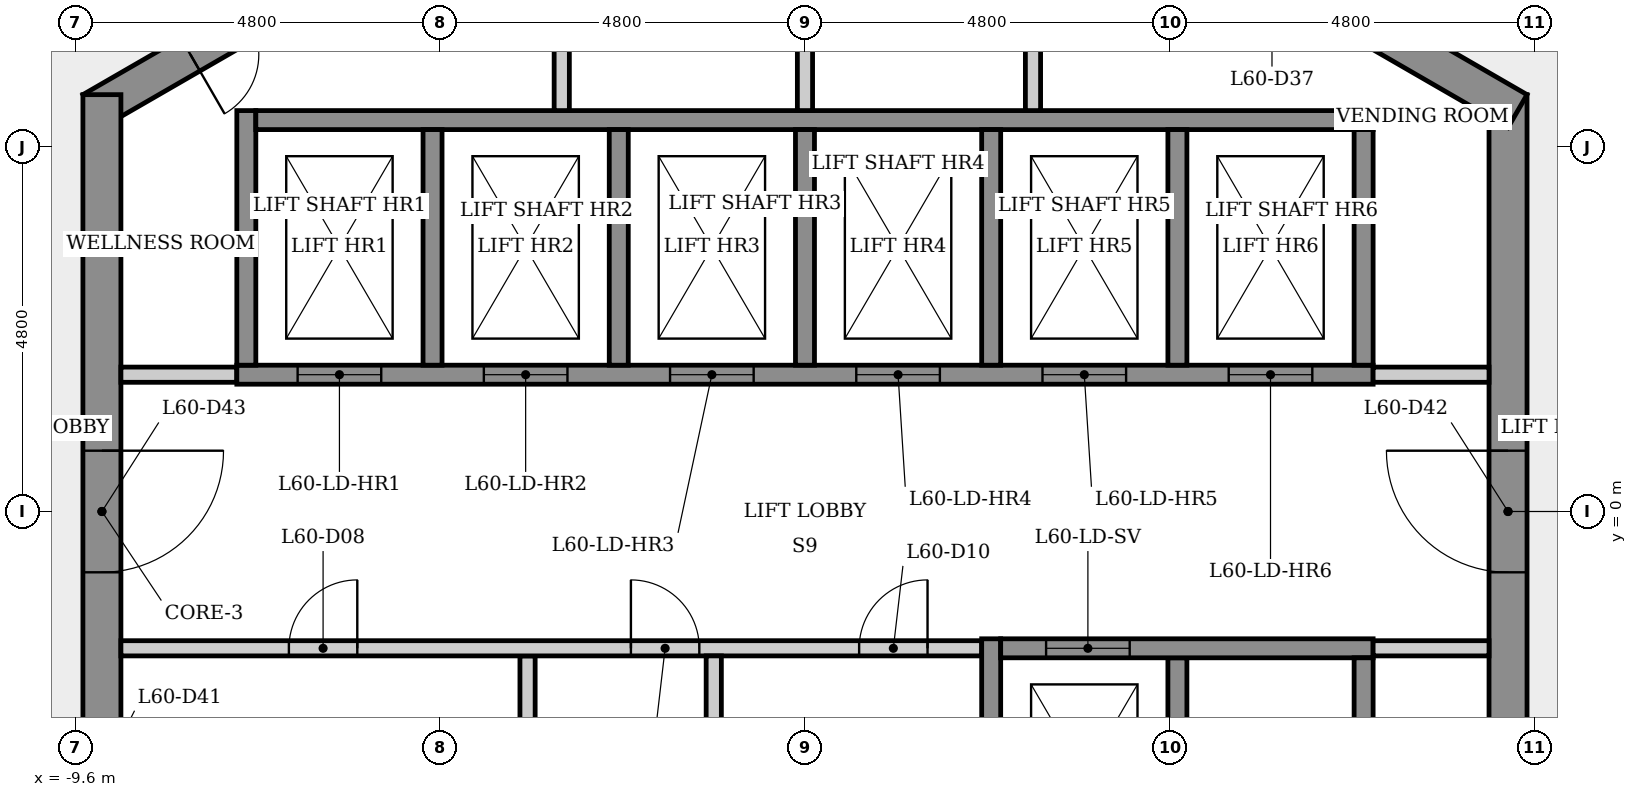
"""IFC4 building model, lengths in metres.
Left out: names, types, materials, properties, quantities, classifications, styles, units other than length and angle.
Written with IfcOpenShell. Run it as: python <this file> out.ifc"""

import sys

from ifc_helpers import new_model, si_unit, direction, frame, frame_2d, origin, place, context, subcontext, project, spatial, rectangle, extrude, element, fill, save


model = new_model("IFC4")
c1 = context("Model", 3, precision=1e-05, world=origin(), true_north=direction((0.0, 1.0)))
c2 = subcontext(c1, "Body", "Model", "MODEL_VIEW")
j1 = project(units=[si_unit("LENGTHUNIT", "METRE"), si_unit("PLANEANGLEUNIT", "RADIAN")], contexts=[c1])
p1 = place(None, origin())
s1 = spatial("IfcSite", under=j1, at=p1, CompositionType="ELEMENT")
p2 = place(p1, origin())
s2 = spatial("IfcBuilding", under=s1, at=p2, CompositionType="ELEMENT")
p3 = place(p2, frame((0.0, 0.0, 225.7)))
s3 = spatial("IfcBuildingStorey", under=s2, at=p3, CompositionType="ELEMENT", Elevation=225.7)
p4 = place(p3, frame((9.25, -5.485, 0.0), z_axis=(0.0, 0.0, 1.0), x_axis=(0.0, 1.0, 0.0)))
e1 = element("IfcWall", 1, at=p4, inside=s3, PredefinedType="SHEAR", context=c2, shape_type="SweptSolid", body=[
    extrude(rectangle(XDim=10.97, YDim=0.5, at=frame_2d((5.485, 0.0))), origin(), (0.0, 0.0, 1.0), 3.4),
])
p5 = place(p4, frame((4.685, 0.0, 0.0)))
e2 = element("IfcOpeningElement", 2, at=p5, cuts=e1, PredefinedType="OPENING", context=c2, shape_type="SweptSolid", body=[
    extrude(rectangle(XDim=1.6, YDim=2.1, at=frame_2d((0.8, 1.05))), frame((0.0, 0.26, 0.0), z_axis=(0.0, -1.0, 0.0), x_axis=(1.0, 0.0, 0.0)), (0.0, 0.0, 1.0), 0.52),
])
p6 = place(p3, frame((9.375, 5.268, 0.0), z_axis=(0.0, 0.0, 1.0), x_axis=(-0.866023993627, 0.500002442456, 0.0)))
e3 = element("IfcWall", 3, at=p6, inside=s3, PredefinedType="SHEAR", context=c2, shape_type="SweptSolid", body=[
    extrude(rectangle(XDim=10.97, YDim=0.5, at=frame_2d((5.485, 0.0))), origin(), (0.0, 0.0, 1.0), 3.4),
])
p7 = place(p6, frame((8.5, 0.0, 0.0)))
e4 = element("IfcOpeningElement", 4, at=p7, cuts=e3, PredefinedType="OPENING", context=c2, shape_type="SweptSolid", body=[
    extrude(rectangle(XDim=0.9, YDim=2.1, at=frame_2d((0.45, 1.05))), frame((0.0, 0.26, 0.0), z_axis=(0.0, -1.0, 0.0), x_axis=(1.0, 0.0, 0.0)), (0.0, 0.0, 1.0), 0.52),
])
p8 = place(p6, frame((3.28, 0.0, 0.0)))
e5 = element("IfcOpeningElement", 5, at=p8, cuts=e3, PredefinedType="OPENING", context=c2, shape_type="SweptSolid", body=[
    extrude(rectangle(XDim=0.9, YDim=2.1, at=frame_2d((0.45, 1.05))), frame((0.0, 0.26, 0.0), z_axis=(0.0, -1.0, 0.0), x_axis=(1.0, 0.0, 0.0)), (0.0, 0.0, 1.0), 0.52),
])
p9 = place(p3, frame((0.125, 10.753, 0.0), z_axis=(0.0, 0.0, 1.0), x_axis=(-0.866023993627, -0.500002442456, 0.0)))
e6 = element("IfcWall", 6, at=p9, inside=s3, PredefinedType="SHEAR", context=c2, shape_type="SweptSolid", body=[
    extrude(rectangle(XDim=10.97, YDim=0.5, at=frame_2d((5.485, 0.0))), origin(), (0.0, 0.0, 1.0), 3.4),
])
p10 = place(p9, frame((8.581, 0.0, 0.0)))
e7 = element("IfcOpeningElement", 7, at=p10, cuts=e6, PredefinedType="OPENING", context=c2, shape_type="SweptSolid", body=[
    extrude(rectangle(XDim=0.9, YDim=2.1, at=frame_2d((0.45, 1.05))), frame((0.0, 0.26, 0.0), z_axis=(0.0, -1.0, 0.0), x_axis=(1.0, 0.0, 0.0)), (0.0, 0.0, 1.0), 0.52),
])
p11 = place(p9, frame((1.687, 0.0, 0.0)))
e8 = element("IfcOpeningElement", 8, at=p11, cuts=e6, PredefinedType="OPENING", context=c2, shape_type="SweptSolid", body=[
    extrude(rectangle(XDim=0.9, YDim=2.1, at=frame_2d((0.45, 1.05))), frame((0.0, 0.26, 0.0), z_axis=(0.0, -1.0, 0.0), x_axis=(1.0, 0.0, 0.0)), (0.0, 0.0, 1.0), 0.52),
])
p12 = place(p3, frame((-9.25, 5.485, 0.0), z_axis=(0.0, 0.0, 1.0), x_axis=(0.0, -1.0, 0.0)))
e9 = element("IfcWall", 9, at=p12, inside=s3, PredefinedType="SHEAR", context=c2, shape_type="SweptSolid", body=[
    extrude(rectangle(XDim=10.97, YDim=0.5, at=frame_2d((5.485, 0.0))), origin(), (0.0, 0.0, 1.0), 3.4),
])
p13 = place(p12, frame((8.51, 0.0, 0.0)))
e10 = element("IfcOpeningElement", 10, at=p13, cuts=e9, PredefinedType="OPENING", context=c2, shape_type="SweptSolid", body=[
    extrude(rectangle(XDim=0.9, YDim=2.1, at=frame_2d((0.45, 1.05))), frame((0.0, 0.26, 0.0), z_axis=(0.0, -1.0, 0.0), x_axis=(1.0, 0.0, 0.0)), (0.0, 0.0, 1.0), 0.52),
])
p14 = place(p12, frame((4.685, 0.0, 0.0)))
e11 = element("IfcOpeningElement", 11, at=p14, cuts=e9, PredefinedType="OPENING", context=c2, shape_type="SweptSolid", body=[
    extrude(rectangle(XDim=1.6, YDim=2.1, at=frame_2d((0.8, 1.05))), frame((0.0, 0.26, 0.0), z_axis=(0.0, -1.0, 0.0), x_axis=(1.0, 0.0, 0.0)), (0.0, 0.0, 1.0), 0.52),
])
p15 = place(p3, frame((-9.0, 1.8, 0.0), z_axis=(0.0, 0.0, 1.0), x_axis=(1.0, 0.0, 0.0)))
e12 = element("IfcWall", 12, at=p15, inside=s3, PredefinedType="PARTITIONING", context=c2, shape_type="SweptSolid", body=[
    extrude(rectangle(XDim=1.525, YDim=0.2, at=frame_2d((0.763, 0.0))), origin(), (0.0, 0.0, 1.0), 3.05),
])
p16 = place(p3, frame((-7.475, 1.8, 0.0), z_axis=(0.0, 0.0, 1.0), x_axis=(1.0, 0.0, 0.0)))
e13 = element("IfcWall", 13, at=p16, inside=s3, PredefinedType="SHEAR", context=c2, shape_type="SweptSolid", body=[
    extrude(rectangle(XDim=14.95, YDim=0.25, at=frame_2d((7.475, 0.0))), origin(), (0.0, 0.0, 1.0), 3.05),
])
p17 = place(p16, frame((0.8, 0.0, 0.0)))
e14 = element("IfcOpeningElement", 14, at=p17, cuts=e13, PredefinedType="OPENING", context=c2, shape_type="SweptSolid", body=[
    extrude(rectangle(XDim=1.1, YDim=2.1, at=frame_2d((0.55, 1.05))), frame((0.0, 0.135, 0.0), z_axis=(0.0, -1.0, 0.0), x_axis=(1.0, 0.0, 0.0)), (0.0, 0.0, 1.0), 0.27),
])
p18 = place(p16, frame((3.25, 0.0, 0.0)))
e15 = element("IfcOpeningElement", 15, at=p18, cuts=e13, PredefinedType="OPENING", context=c2, shape_type="SweptSolid", body=[
    extrude(rectangle(XDim=1.1, YDim=2.1, at=frame_2d((0.55, 1.05))), frame((0.0, 0.135, 0.0), z_axis=(0.0, -1.0, 0.0), x_axis=(1.0, 0.0, 0.0)), (0.0, 0.0, 1.0), 0.27),
])
p19 = place(p16, frame((5.7, 0.0, 0.0)))
e16 = element("IfcOpeningElement", 16, at=p19, cuts=e13, PredefinedType="OPENING", context=c2, shape_type="SweptSolid", body=[
    extrude(rectangle(XDim=1.1, YDim=2.1, at=frame_2d((0.55, 1.05))), frame((0.0, 0.135, 0.0), z_axis=(0.0, -1.0, 0.0), x_axis=(1.0, 0.0, 0.0)), (0.0, 0.0, 1.0), 0.27),
])
p20 = place(p16, frame((8.15, 0.0, 0.0)))
e17 = element("IfcOpeningElement", 17, at=p20, cuts=e13, PredefinedType="OPENING", context=c2, shape_type="SweptSolid", body=[
    extrude(rectangle(XDim=1.1, YDim=2.1, at=frame_2d((0.55, 1.05))), frame((0.0, 0.135, 0.0), z_axis=(0.0, -1.0, 0.0), x_axis=(1.0, 0.0, 0.0)), (0.0, 0.0, 1.0), 0.27),
])
p21 = place(p16, frame((10.6, 0.0, 0.0)))
e18 = element("IfcOpeningElement", 18, at=p21, cuts=e13, PredefinedType="OPENING", context=c2, shape_type="SweptSolid", body=[
    extrude(rectangle(XDim=1.1, YDim=2.1, at=frame_2d((0.55, 1.05))), frame((0.0, 0.135, 0.0), z_axis=(0.0, -1.0, 0.0), x_axis=(1.0, 0.0, 0.0)), (0.0, 0.0, 1.0), 0.27),
])
p22 = place(p16, frame((13.05, 0.0, 0.0)))
e19 = element("IfcOpeningElement", 19, at=p22, cuts=e13, PredefinedType="OPENING", context=c2, shape_type="SweptSolid", body=[
    extrude(rectangle(XDim=1.1, YDim=2.1, at=frame_2d((0.55, 1.05))), frame((0.0, 0.135, 0.0), z_axis=(0.0, -1.0, 0.0), x_axis=(1.0, 0.0, 0.0)), (0.0, 0.0, 1.0), 0.27),
])
p23 = place(p3, frame((-7.35, 1.925, 0.0), z_axis=(0.0, 0.0, 1.0), x_axis=(0.0, 1.0, 0.0)))
e20 = element("IfcWall", 20, at=p23, inside=s3, PredefinedType="SHEAR", context=c2, shape_type="SweptSolid", body=[
    extrude(rectangle(XDim=3.35, YDim=0.25, at=frame_2d((1.675, 0.0))), origin(), (0.0, 0.0, 1.0), 3.05),
])
p24 = place(p3, frame((-7.225, 5.15, 0.0), z_axis=(0.0, 0.0, 1.0), x_axis=(1.0, 0.0, 0.0)))
e21 = element("IfcWall", 21, at=p24, inside=s3, PredefinedType="SHEAR", context=c2, shape_type="SweptSolid", body=[
    extrude(rectangle(XDim=14.7, YDim=0.25, at=frame_2d((7.35, 0.0))), origin(), (0.0, 0.0, 1.0), 3.05),
])
p25 = place(p3, frame((-4.9, 5.025, 0.0), z_axis=(0.0, 0.0, 1.0), x_axis=(0.0, -1.0, 0.0)))
e22 = element("IfcWall", 22, at=p25, inside=s3, PredefinedType="SHEAR", context=c2, shape_type="SweptSolid", body=[
    extrude(rectangle(XDim=3.1, YDim=0.25, at=frame_2d((1.55, 0.0))), origin(), (0.0, 0.0, 1.0), 3.4),
])
p26 = place(p3, frame((-3.65, -1.9, 0.0), z_axis=(0.0, 0.0, 1.0), x_axis=(0.0, -1.0, 0.0)))
e23 = element("IfcWall", 23, at=p26, inside=s3, PredefinedType="PARTITIONING", context=c2, shape_type="SweptSolid", body=[
    extrude(rectangle(XDim=3.15, YDim=0.2, at=frame_2d((1.575, 0.0))), origin(), (0.0, 0.0, 1.0), 3.05),
])
p27 = place(p3, frame((-9.0, -1.8, 0.0), z_axis=(0.0, 0.0, 1.0), x_axis=(1.0, 0.0, 0.0)))
e24 = element("IfcWall", 24, at=p27, inside=s3, PredefinedType="PARTITIONING", context=c2, shape_type="SweptSolid", body=[
    extrude(rectangle(XDim=11.325, YDim=0.2, at=frame_2d((5.663, 0.0))), origin(), (0.0, 0.0, 1.0), 3.05),
])
p28 = place(p27, frame((2.21, 0.0, 0.0)))
e25 = element("IfcOpeningElement", 25, at=p28, cuts=e24, PredefinedType="OPENING", context=c2, shape_type="SweptSolid", body=[
    extrude(rectangle(XDim=0.9, YDim=2.1, at=frame_2d((0.45, 1.05))), frame((0.0, 0.11, 0.0), z_axis=(0.0, -1.0, 0.0), x_axis=(1.0, 0.0, 0.0)), (0.0, 0.0, 1.0), 0.22),
])
p29 = place(p27, frame((6.71, 0.0, 0.0)))
e26 = element("IfcOpeningElement", 26, at=p29, cuts=e24, PredefinedType="OPENING", context=c2, shape_type="SweptSolid", body=[
    extrude(rectangle(XDim=0.9, YDim=2.1, at=frame_2d((0.45, 1.05))), frame((0.0, 0.11, 0.0), z_axis=(0.0, -1.0, 0.0), x_axis=(1.0, 0.0, 0.0)), (0.0, 0.0, 1.0), 0.22),
])
p30 = place(p27, frame((9.713, 0.0, 0.0)))
e27 = element("IfcOpeningElement", 27, at=p30, cuts=e24, PredefinedType="OPENING", context=c2, shape_type="SweptSolid", body=[
    extrude(rectangle(XDim=0.9, YDim=2.1, at=frame_2d((0.45, 1.05))), frame((0.0, 0.11, 0.0), z_axis=(0.0, -1.0, 0.0), x_axis=(1.0, 0.0, 0.0)), (0.0, 0.0, 1.0), 0.22),
])
p31 = place(p3, frame((-3.2, 8.545, 0.0), z_axis=(0.0, 0.0, 1.0), x_axis=(0.0, -1.0, 0.0)))
e28 = element("IfcWall", 28, at=p31, inside=s3, PredefinedType="PARTITIONING", context=c2, shape_type="SweptSolid", body=[
    extrude(rectangle(XDim=3.27, YDim=0.2, at=frame_2d((1.635, 0.0))), origin(), (0.0, 0.0, 1.0), 3.05),
])
p32 = place(p3, frame((-2.45, 5.025, 0.0), z_axis=(0.0, 0.0, 1.0), x_axis=(0.0, -1.0, 0.0)))
e29 = element("IfcWall", 29, at=p32, inside=s3, PredefinedType="SHEAR", context=c2, shape_type="SweptSolid", body=[
    extrude(rectangle(XDim=3.1, YDim=0.25, at=frame_2d((1.55, 0.0))), origin(), (0.0, 0.0, 1.0), 3.4),
])
p33 = place(p3, frame((-1.2, -1.9, 0.0), z_axis=(0.0, 0.0, 1.0), x_axis=(0.0, -1.0, 0.0)))
e30 = element("IfcWall", 30, at=p33, inside=s3, PredefinedType="PARTITIONING", context=c2, shape_type="SweptSolid", body=[
    extrude(rectangle(XDim=3.15, YDim=0.2, at=frame_2d((1.575, 0.0))), origin(), (0.0, 0.0, 1.0), 3.05),
])
p34 = place(p3, frame((0.0, 5.025, 0.0), z_axis=(0.0, 0.0, 1.0), x_axis=(0.0, -1.0, 0.0)))
e31 = element("IfcWall", 31, at=p34, inside=s3, PredefinedType="SHEAR", context=c2, shape_type="SweptSolid", body=[
    extrude(rectangle(XDim=3.1, YDim=0.25, at=frame_2d((1.55, 0.0))), origin(), (0.0, 0.0, 1.0), 3.4),
])
p35 = place(p3, frame((0.0, 10.392, 0.0), z_axis=(0.0, 0.0, 1.0), x_axis=(0.0, -1.0, 0.0)))
e32 = element("IfcWall", 32, at=p35, inside=s3, PredefinedType="PARTITIONING", context=c2, shape_type="SweptSolid", body=[
    extrude(rectangle(XDim=5.117, YDim=0.2, at=frame_2d((2.559, 0.0))), origin(), (0.0, 0.0, 1.0), 3.05),
])
p36 = place(p3, frame((2.45, -5.275, 0.0), z_axis=(0.0, 0.0, 1.0), x_axis=(0.0, 1.0, 0.0)))
e33 = element("IfcWall", 33, at=p36, inside=s3, PredefinedType="SHEAR", context=c2, shape_type="SweptSolid", body=[
    extrude(rectangle(XDim=3.6, YDim=0.25, at=frame_2d((1.8, 0.0))), origin(), (0.0, 0.0, 1.0), 3.05),
])
p37 = place(p3, frame((2.45, 5.025, 0.0), z_axis=(0.0, 0.0, 1.0), x_axis=(0.0, -1.0, 0.0)))
e34 = element("IfcWall", 34, at=p37, inside=s3, PredefinedType="SHEAR", context=c2, shape_type="SweptSolid", body=[
    extrude(rectangle(XDim=3.1, YDim=0.25, at=frame_2d((1.55, 0.0))), origin(), (0.0, 0.0, 1.0), 3.4),
])
p38 = place(p3, frame((3.0, 8.66, 0.0), z_axis=(0.0, 0.0, 1.0), x_axis=(0.0, -1.0, 0.0)))
e35 = element("IfcWall", 35, at=p38, inside=s3, PredefinedType="PARTITIONING", context=c2, shape_type="SweptSolid", body=[
    extrude(rectangle(XDim=3.385, YDim=0.2, at=frame_2d((1.693, 0.0))), origin(), (0.0, 0.0, 1.0), 3.05),
])
for number, where, z_axis, x_axis in (
    (36, (4.9, -1.925, 0.0), (0.0, 0.0, 1.0), (0.0, -1.0, 0.0)),
    (37, (4.9, 5.025, 0.0), (0.0, 0.0, 1.0), (0.0, -1.0, 0.0)),
):
    element("IfcWall", number, at=place(p3, frame(where, z_axis=z_axis, x_axis=x_axis)), inside=s3, PredefinedType="SHEAR", context=c2, shape_type="SweptSolid", body=[
        extrude(rectangle(XDim=3.1, YDim=0.25, at=frame_2d((1.55, 0.0))), origin(), (0.0, 0.0, 1.0), 3.4),
    ])
p39 = place(p3, frame((2.575, -1.8, 0.0), z_axis=(0.0, 0.0, 1.0), x_axis=(1.0, 0.0, 0.0)))
e38 = element("IfcWall", 38, at=p39, inside=s3, PredefinedType="SHEAR", context=c2, shape_type="SweptSolid", body=[
    extrude(rectangle(XDim=4.9, YDim=0.25, at=frame_2d((2.45, 0.0))), origin(), (0.0, 0.0, 1.0), 3.05),
])
p40 = place(p39, frame((0.597, 0.0, 0.0)))
e39 = element("IfcOpeningElement", 39, at=p40, cuts=e38, PredefinedType="OPENING", context=c2, shape_type="SweptSolid", body=[
    extrude(rectangle(XDim=1.1, YDim=2.1, at=frame_2d((0.55, 1.05))), frame((0.0, 0.135, 0.0), z_axis=(0.0, -1.0, 0.0), x_axis=(1.0, 0.0, 0.0)), (0.0, 0.0, 1.0), 0.27),
])
p41 = place(p3, frame((7.475, 1.8, 0.0), z_axis=(0.0, 0.0, 1.0), x_axis=(1.0, 0.0, 0.0)))
e40 = element("IfcWall", 40, at=p41, inside=s3, PredefinedType="PARTITIONING", context=c2, shape_type="SweptSolid", body=[
    extrude(rectangle(XDim=1.525, YDim=0.2, at=frame_2d((0.763, 0.0))), origin(), (0.0, 0.0, 1.0), 3.05),
])
for number, where, z_axis, x_axis in (
    (41, (7.35, -1.925, 0.0), (0.0, 0.0, 1.0), (0.0, -1.0, 0.0)),
    (42, (7.35, 5.025, 0.0), (0.0, 0.0, 1.0), (0.0, -1.0, 0.0)),
):
    element("IfcWall", number, at=place(p3, frame(where, z_axis=z_axis, x_axis=x_axis)), inside=s3, PredefinedType="SHEAR", context=c2, shape_type="SweptSolid", body=[
        extrude(rectangle(XDim=3.1, YDim=0.25, at=frame_2d((1.55, 0.0))), origin(), (0.0, 0.0, 1.0), 3.4),
    ])
p42 = place(p3, frame((9.0, -1.8, 0.0), z_axis=(0.0, 0.0, 1.0), x_axis=(-1.0, 0.0, 0.0)))
e43 = element("IfcWall", 43, at=p42, inside=s3, PredefinedType="PARTITIONING", context=c2, shape_type="SweptSolid", body=[
    extrude(rectangle(XDim=1.525, YDim=0.2, at=frame_2d((0.763, 0.0))), origin(), (0.0, 0.0, 1.0), 3.05),
])
p43 = place(p17, origin())
e44 = element("IfcDoor", 44, at=p43, inside=s3, OperationType="SLIDING_TO_LEFT", PredefinedType="DOOR", context=c2, shape_type="SweptSolid", body=[
    extrude(rectangle(XDim=1.1, YDim=2.1, at=frame_2d((0.55, 1.05))), frame((0.0, 0.025, 0.0), z_axis=(0.0, -1.0, 0.0), x_axis=(1.0, 0.0, 0.0)), (0.0, 0.0, 1.0), 0.05),
])
fill(e14, e44)
p44 = place(p18, origin())
e45 = element("IfcDoor", 45, at=p44, inside=s3, OperationType="SLIDING_TO_LEFT", PredefinedType="DOOR", context=c2, shape_type="SweptSolid", body=[
    extrude(rectangle(XDim=1.1, YDim=2.1, at=frame_2d((0.55, 1.05))), frame((0.0, 0.025, 0.0), z_axis=(0.0, -1.0, 0.0), x_axis=(1.0, 0.0, 0.0)), (0.0, 0.0, 1.0), 0.05),
])
fill(e15, e45)
p45 = place(p19, origin())
e46 = element("IfcDoor", 46, at=p45, inside=s3, OperationType="SLIDING_TO_LEFT", PredefinedType="DOOR", context=c2, shape_type="SweptSolid", body=[
    extrude(rectangle(XDim=1.1, YDim=2.1, at=frame_2d((0.55, 1.05))), frame((0.0, 0.025, 0.0), z_axis=(0.0, -1.0, 0.0), x_axis=(1.0, 0.0, 0.0)), (0.0, 0.0, 1.0), 0.05),
])
fill(e16, e46)
p46 = place(p20, origin())
e47 = element("IfcDoor", 47, at=p46, inside=s3, OperationType="SLIDING_TO_LEFT", PredefinedType="DOOR", context=c2, shape_type="SweptSolid", body=[
    extrude(rectangle(XDim=1.1, YDim=2.1, at=frame_2d((0.55, 1.05))), frame((0.0, 0.025, 0.0), z_axis=(0.0, -1.0, 0.0), x_axis=(1.0, 0.0, 0.0)), (0.0, 0.0, 1.0), 0.05),
])
fill(e17, e47)
p47 = place(p21, origin())
e48 = element("IfcDoor", 48, at=p47, inside=s3, OperationType="SLIDING_TO_LEFT", PredefinedType="DOOR", context=c2, shape_type="SweptSolid", body=[
    extrude(rectangle(XDim=1.1, YDim=2.1, at=frame_2d((0.55, 1.05))), frame((0.0, 0.025, 0.0), z_axis=(0.0, -1.0, 0.0), x_axis=(1.0, 0.0, 0.0)), (0.0, 0.0, 1.0), 0.05),
])
fill(e18, e48)
p48 = place(p22, origin())
e49 = element("IfcDoor", 49, at=p48, inside=s3, OperationType="SLIDING_TO_LEFT", PredefinedType="DOOR", context=c2, shape_type="SweptSolid", body=[
    extrude(rectangle(XDim=1.1, YDim=2.1, at=frame_2d((0.55, 1.05))), frame((0.0, 0.025, 0.0), z_axis=(0.0, -1.0, 0.0), x_axis=(1.0, 0.0, 0.0)), (0.0, 0.0, 1.0), 0.05),
])
fill(e19, e49)
p49 = place(p40, origin())
e50 = element("IfcDoor", 50, at=p49, inside=s3, OperationType="SLIDING_TO_LEFT", PredefinedType="DOOR", context=c2, shape_type="SweptSolid", body=[
    extrude(rectangle(XDim=1.1, YDim=2.1, at=frame_2d((0.55, 1.05))), frame((0.0, 0.025, 0.0), z_axis=(0.0, -1.0, 0.0), x_axis=(1.0, 0.0, 0.0)), (0.0, 0.0, 1.0), 0.05),
])
fill(e39, e50)
p50 = place(p28, origin())
e51 = element("IfcDoor", 51, at=p50, inside=s3, OperationType="SINGLE_SWING_RIGHT", PredefinedType="DOOR", context=c2, shape_type="SweptSolid", body=[
    extrude(rectangle(XDim=0.9, YDim=2.1, at=frame_2d((0.45, 1.05))), frame((0.0, 0.025, 0.0), z_axis=(0.0, -1.0, 0.0), x_axis=(1.0, 0.0, 0.0)), (0.0, 0.0, 1.0), 0.05),
])
fill(e25, e51)
p51 = place(p29, origin())
e52 = element("IfcDoor", 52, at=p51, inside=s3, OperationType="SINGLE_SWING_LEFT", PredefinedType="DOOR", context=c2, shape_type="SweptSolid", body=[
    extrude(rectangle(XDim=0.9, YDim=2.1, at=frame_2d((0.45, 1.05))), frame((0.0, 0.025, 0.0), z_axis=(0.0, -1.0, 0.0), x_axis=(1.0, 0.0, 0.0)), (0.0, 0.0, 1.0), 0.05),
])
fill(e26, e52)
p52 = place(p30, origin())
e53 = element("IfcDoor", 53, at=p52, inside=s3, OperationType="SINGLE_SWING_RIGHT", PredefinedType="DOOR", context=c2, shape_type="SweptSolid", body=[
    extrude(rectangle(XDim=0.9, YDim=2.1, at=frame_2d((0.45, 1.05))), frame((0.0, 0.025, 0.0), z_axis=(0.0, -1.0, 0.0), x_axis=(1.0, 0.0, 0.0)), (0.0, 0.0, 1.0), 0.05),
])
fill(e27, e53)
p53 = place(p10, origin())
e54 = element("IfcDoor", 54, at=p53, inside=s3, OperationType="SINGLE_SWING_RIGHT", PredefinedType="DOOR", context=c2, shape_type="SweptSolid", body=[
    extrude(rectangle(XDim=0.9, YDim=2.1, at=frame_2d((0.45, 1.05))), frame((0.0, 0.025, 0.0), z_axis=(0.0, -1.0, 0.0), x_axis=(1.0, 0.0, 0.0)), (0.0, 0.0, 1.0), 0.05),
])
fill(e7, e54)
p54 = place(p5, origin())
e55 = element("IfcDoor", 55, at=p54, inside=s3, OperationType="SINGLE_SWING_RIGHT", PredefinedType="DOOR", context=c2, shape_type="SweptSolid", body=[
    extrude(rectangle(XDim=1.6, YDim=2.1, at=frame_2d((0.8, 1.05))), frame((0.0, 0.025, 0.0), z_axis=(0.0, -1.0, 0.0), x_axis=(1.0, 0.0, 0.0)), (0.0, 0.0, 1.0), 0.05),
])
fill(e2, e55)
p55 = place(p14, origin())
e56 = element("IfcDoor", 56, at=p55, inside=s3, OperationType="SINGLE_SWING_LEFT", PredefinedType="DOOR", context=c2, shape_type="SweptSolid", body=[
    extrude(rectangle(XDim=1.6, YDim=2.1, at=frame_2d((0.8, 1.05))), frame((0.0, 0.025, 0.0), z_axis=(0.0, -1.0, 0.0), x_axis=(1.0, 0.0, 0.0)), (0.0, 0.0, 1.0), 0.05),
])
fill(e11, e56)
save(model, sys.argv[1])
